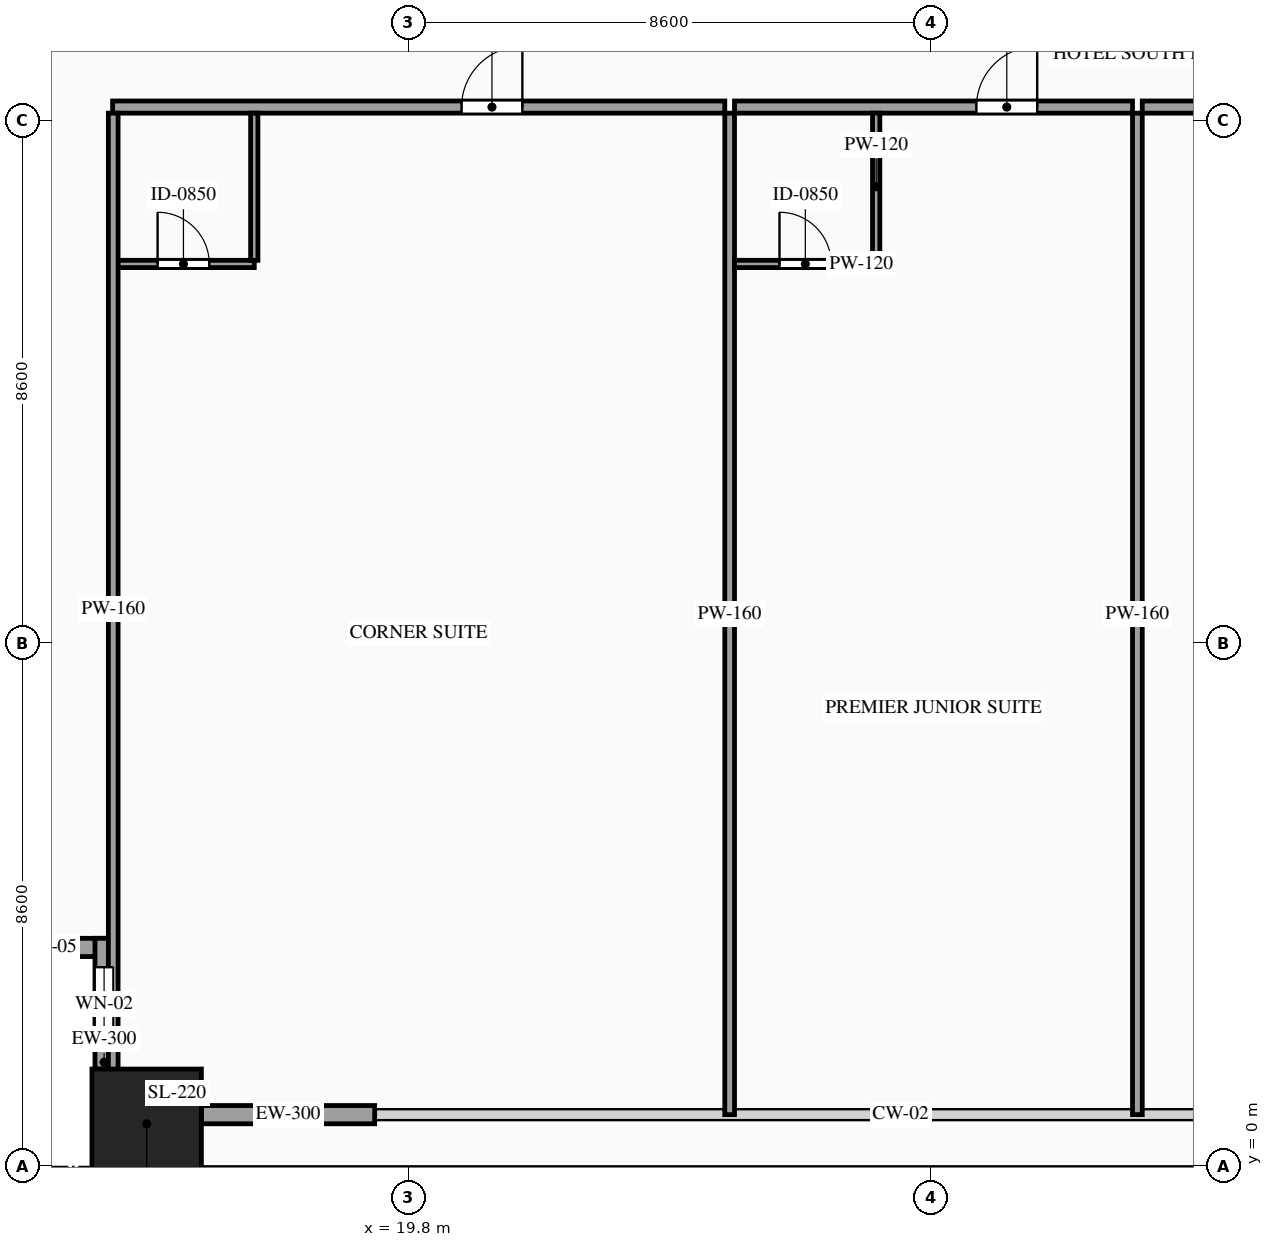
"""IFC4 building model, lengths in metres.
Left out: names, types, materials, properties, quantities, classifications, styles, units other than length and angle.
Written with IfcOpenShell. Run it as: python <this file> out.ifc"""

import sys

from ifc_helpers import new_model, si_unit, direction, frame, frame_2d, origin, origin_2d, place, context, subcontext, project, spatial, rectangle, hollow_rectangle, extrude, source, transform, mapped, element, fill, save


model = new_model("IFC4")
c1 = context("Model", 3, precision=1e-05, world=origin(), true_north=direction((0.0, 1.0)))
c2 = subcontext(c1, "Body", "Model", "MODEL_VIEW")
j1 = project(units=[si_unit("LENGTHUNIT", "METRE"), si_unit("PLANEANGLEUNIT", "RADIAN")], contexts=[c1])
p1 = place(None, origin())
s1 = spatial("IfcSite", under=j1, at=p1, CompositionType="ELEMENT")
p2 = place(p1, origin())
s2 = spatial("IfcBuilding", under=s1, at=p2, CompositionType="ELEMENT")
p3 = place(p2, frame((0.0, 0.0, 46.0)))
s3 = spatial("IfcBuildingStorey", under=s2, at=p3, CompositionType="ELEMENT", Elevation=46.0)
m1 = source(origin(), c2, "Body", "SweptSolid", [
    extrude(hollow_rectangle(XDim=1.8, YDim=1.8, WallThickness=0.08, at=origin_2d()), origin(), (0.0, 0.0, 1.0), 3.6),
])
p4 = place(p3, frame((15.5, 0.7, 0.0), z_axis=(0.0, 0.0, 1.0), x_axis=(1.0, 0.0, 0.0)))
e1 = element("IfcColumn", 1, at=p4, inside=s3, PredefinedType="COLUMN", context=c2, shape_type="MappedRepresentation", body=[
    mapped(m1, transform((0.0, 0.0, 0.0), scale=1.0)),
])
p5 = place(p3, frame((12.8, 3.6, 0.0), z_axis=(0.0, 0.0, 1.0), x_axis=(1.0, 0.0, 0.0)))
e2 = element("IfcWall", 2, at=p5, inside=s3, PredefinedType="SOLIDWALL", context=c2, shape_type="SweptSolid", body=[
    extrude(rectangle(XDim=2.15, YDim=0.3, at=frame_2d((1.075, 0.0))), origin(), (0.0, 0.0, 1.0), 3.38),
])
p6 = place(p5, frame((0.625, 0.0, 0.85)))
e3 = element("IfcOpeningElement", 3, at=p6, cuts=e2, PredefinedType="OPENING", context=c2, shape_type="SweptSolid", body=[
    extrude(rectangle(XDim=0.9, YDim=1.5, at=frame_2d((0.45, 0.75))), frame((0.0, 0.165, 0.0), z_axis=(0.0, -1.0, 0.0), x_axis=(1.0, 0.0, 0.0)), (0.0, 0.0, 1.0), 0.33),
])
p7 = place(p3, frame((14.8, 3.75, 0.0), z_axis=(0.0, 0.0, 1.0), x_axis=(0.0, -1.0, 0.0)))
e4 = element("IfcWall", 4, at=p7, inside=s3, PredefinedType="SOLIDWALL", context=c2, shape_type="SweptSolid", body=[
    extrude(rectangle(XDim=2.15, YDim=0.3, at=frame_2d((1.075, 0.0))), origin(), (0.0, 0.0, 1.0), 3.38),
])
p8 = place(p7, frame((0.475, 0.0, 0.85)))
e5 = element("IfcOpeningElement", 5, at=p8, cuts=e4, PredefinedType="OPENING", context=c2, shape_type="SweptSolid", body=[
    extrude(rectangle(XDim=1.2, YDim=2.1, at=frame_2d((0.6, 1.05))), frame((0.0, 0.165, 0.0), z_axis=(0.0, -1.0, 0.0), x_axis=(1.0, 0.0, 0.0)), (0.0, 0.0, 1.0), 0.33),
])
m2 = source(origin(), c2, "Body", "SweptSolid", [
    extrude(rectangle(XDim=2.85, YDim=0.3, at=frame_2d((1.425, 0.0))), origin(), (0.0, 0.0, 1.0), 2.775),
])
p9 = place(p3, frame((16.4, 0.85, 0.0), z_axis=(0.0, 0.0, 1.0), x_axis=(1.0, 0.0, 0.0)))
e6 = element("IfcWall", 6, at=p9, inside=s3, PredefinedType="SOLIDWALL", context=c2, shape_type="MappedRepresentation", body=[
    mapped(m2, transform((0.0, 0.0, 0.0), scale=1.0)),
])
p10 = place(p3, frame((14.94, 17.42, 0.0), z_axis=(0.0, 0.0, 1.0), x_axis=(1.0, 0.0, 0.0)))
e7 = element("IfcWall", 7, at=p10, inside=s3, PredefinedType="PARTITIONING", context=c2, shape_type="SweptSolid", body=[
    extrude(rectangle(XDim=10.068, YDim=0.2, at=frame_2d((5.034, 0.0))), origin(), (0.0, 0.0, 1.0), 3.38),
])
p11 = place(p10, frame((5.739, 0.0, 0.0)))
e8 = element("IfcOpeningElement", 8, at=p11, cuts=e7, PredefinedType="OPENING", context=c2, shape_type="SweptSolid", body=[
    extrude(rectangle(XDim=1.0, YDim=2.2, at=frame_2d((0.5, 1.1))), frame((0.0, 0.115, 0.0), z_axis=(0.0, -1.0, 0.0), x_axis=(1.0, 0.0, 0.0)), (0.0, 0.0, 1.0), 0.23),
])
m3 = source(origin(), c2, "Body", "SweptSolid", [
    extrude(rectangle(XDim=16.47, YDim=0.16, at=frame_2d((8.235, 0.0))), origin(), (0.0, 0.0, 1.0), 3.38),
])
p12 = place(p3, frame((25.088, 0.85, 0.0), z_axis=(0.0, 0.0, 1.0), x_axis=(0.0, 1.0, 0.0)))
e9 = element("IfcWall", 9, at=p12, inside=s3, PredefinedType="PARTITIONING", context=c2, shape_type="MappedRepresentation", body=[
    mapped(m3, transform((0.0, 0.0, 0.0), scale=1.0)),
])
p13 = place(p3, frame((14.94, 14.84, 0.0), z_axis=(0.0, 0.0, 1.0), x_axis=(1.0, 0.0, 0.0)))
e10 = element("IfcWall", 10, at=p13, inside=s3, PredefinedType="PARTITIONING", context=c2, shape_type="SweptSolid", body=[
    extrude(rectangle(XDim=2.33, YDim=0.12, at=frame_2d((1.165, 0.0))), origin(), (0.0, 0.0, 1.0), 3.38),
])
p14 = place(p13, frame((0.74, 0.0, 0.0)))
e11 = element("IfcOpeningElement", 11, at=p14, cuts=e10, PredefinedType="OPENING", context=c2, shape_type="SweptSolid", body=[
    extrude(rectangle(XDim=0.85, YDim=2.1, at=frame_2d((0.425, 1.05))), frame((0.0, 0.075, 0.0), z_axis=(0.0, -1.0, 0.0), x_axis=(1.0, 0.0, 0.0)), (0.0, 0.0, 1.0), 0.15),
])
m4 = source(origin(), c2, "Body", "SweptSolid", [
    extrude(rectangle(XDim=2.42, YDim=0.12, at=frame_2d((1.21, 0.0))), origin(), (0.0, 0.0, 1.0), 3.38),
])
p15 = place(p3, frame((17.27, 14.9, 0.0), z_axis=(0.0, 0.0, 1.0), x_axis=(0.0, 1.0, 0.0)))
e12 = element("IfcWall", 12, at=p15, inside=s3, PredefinedType="PARTITIONING", context=c2, shape_type="MappedRepresentation", body=[
    mapped(m4, transform((0.0, 0.0, 0.0), scale=1.0)),
])
p16 = place(p3, frame((25.168, 17.42, 0.0), z_axis=(0.0, 0.0, 1.0), x_axis=(1.0, 0.0, 0.0)))
e13 = element("IfcWall", 13, at=p16, inside=s3, PredefinedType="PARTITIONING", context=c2, shape_type="SweptSolid", body=[
    extrude(rectangle(XDim=6.546, YDim=0.2, at=frame_2d((3.273, 0.0))), origin(), (0.0, 0.0, 1.0), 3.38),
])
p17 = place(p16, frame((3.978, 0.0, 0.0)))
e14 = element("IfcOpeningElement", 14, at=p17, cuts=e13, PredefinedType="OPENING", context=c2, shape_type="SweptSolid", body=[
    extrude(rectangle(XDim=1.0, YDim=2.2, at=frame_2d((0.5, 1.1))), frame((0.0, 0.115, 0.0), z_axis=(0.0, -1.0, 0.0), x_axis=(1.0, 0.0, 0.0)), (0.0, 0.0, 1.0), 0.23),
])
p18 = place(p3, frame((31.794, 0.85, 0.0), z_axis=(0.0, 0.0, 1.0), x_axis=(0.0, 1.0, 0.0)))
e15 = element("IfcWall", 15, at=p18, inside=s3, PredefinedType="PARTITIONING", context=c2, shape_type="MappedRepresentation", body=[
    mapped(m3, transform((0.0, 0.0, 0.0), scale=1.0)),
])
p19 = place(p3, frame((25.168, 14.84, 0.0), z_axis=(0.0, 0.0, 1.0), x_axis=(1.0, 0.0, 0.0)))
e16 = element("IfcWall", 16, at=p19, inside=s3, PredefinedType="PARTITIONING", context=c2, shape_type="SweptSolid", body=[
    extrude(rectangle(XDim=2.33, YDim=0.12, at=frame_2d((1.165, 0.0))), origin(), (0.0, 0.0, 1.0), 3.38),
])
p20 = place(p19, frame((0.74, 0.0, 0.0)))
e17 = element("IfcOpeningElement", 17, at=p20, cuts=e16, PredefinedType="OPENING", context=c2, shape_type="SweptSolid", body=[
    extrude(rectangle(XDim=0.85, YDim=2.1, at=frame_2d((0.425, 1.05))), frame((0.0, 0.075, 0.0), z_axis=(0.0, -1.0, 0.0), x_axis=(1.0, 0.0, 0.0)), (0.0, 0.0, 1.0), 0.15),
])
p21 = place(p3, frame((27.498, 14.9, 0.0), z_axis=(0.0, 0.0, 1.0), x_axis=(0.0, 1.0, 0.0)))
e18 = element("IfcWall", 18, at=p21, inside=s3, PredefinedType="PARTITIONING", context=c2, shape_type="MappedRepresentation", body=[
    mapped(m4, transform((0.0, 0.0, 0.0), scale=1.0)),
])
p22 = place(p3, frame((31.874, 17.42, 0.0), z_axis=(0.0, 0.0, 1.0), x_axis=(1.0, 0.0, 0.0)))
e19 = element("IfcWall", 19, at=p22, inside=s3, PredefinedType="PARTITIONING", context=c2, shape_type="SweptSolid", body=[
    extrude(rectangle(XDim=10.782, YDim=0.2, at=frame_2d((5.391, 0.0))), origin(), (0.0, 0.0, 1.0), 3.38),
])
p23 = place(p22, frame((4.891, 0.0, 0.0)))
e20 = element("IfcOpeningElement", 20, at=p23, cuts=e19, PredefinedType="OPENING", context=c2, shape_type="SweptSolid", body=[
    extrude(rectangle(XDim=1.0, YDim=2.2, at=frame_2d((0.5, 1.1))), frame((0.0, 0.115, 0.0), z_axis=(0.0, -1.0, 0.0), x_axis=(1.0, 0.0, 0.0)), (0.0, 0.0, 1.0), 0.23),
])
m5 = source(origin(), c2, "Body", "SweptSolid", [
    extrude(rectangle(XDim=16.32, YDim=0.16, at=frame_2d((8.16, 0.0))), origin(), (0.0, 0.0, 1.0), 3.38),
])
p24 = place(p3, frame((14.95, 1.0, 0.0), z_axis=(0.0, 0.0, 1.0), x_axis=(0.0, 1.0, 0.0)))
e21 = element("IfcWall", 21, at=p24, inside=s3, PredefinedType="PARTITIONING", context=c2, shape_type="MappedRepresentation", body=[
    mapped(m5, transform((0.0, 0.0, 0.0), scale=1.0)),
])
m6 = source(origin(), c2, "Body", "SweptSolid", [
    extrude(rectangle(XDim=0.9, YDim=1.5, at=frame_2d((0.45, 0.75))), frame((0.0, 0.03, 0.0), z_axis=(0.0, -1.0, 0.0), x_axis=(1.0, 0.0, 0.0)), (0.0, 0.0, 1.0), 0.06),
])
p25 = place(p6, origin())
e22 = element("IfcWindow", 22, at=p25, inside=s3, PartitioningType="SINGLE_PANEL", PredefinedType="WINDOW", context=c2, shape_type="MappedRepresentation", body=[
    mapped(m6, transform((0.0, 0.0, 0.0), scale=1.0)),
])
fill(e3, e22)
m7 = source(origin(), c2, "Body", "SweptSolid", [
    extrude(rectangle(XDim=1.2, YDim=2.1, at=frame_2d((0.6, 1.05))), frame((0.0, 0.03, 0.0), z_axis=(0.0, -1.0, 0.0), x_axis=(1.0, 0.0, 0.0)), (0.0, 0.0, 1.0), 0.06),
])
p26 = place(p8, origin())
e23 = element("IfcWindow", 23, at=p26, inside=s3, PartitioningType="SINGLE_PANEL", PredefinedType="WINDOW", context=c2, shape_type="MappedRepresentation", body=[
    mapped(m7, transform((0.0, 0.0, 0.0), scale=1.0)),
])
fill(e5, e23)
m8 = source(origin(), c2, "Body", "SweptSolid", [
    extrude(rectangle(XDim=1.0, YDim=2.2, at=frame_2d((0.5, 1.1))), frame((0.0, 0.025, 0.0), z_axis=(0.0, -1.0, 0.0), x_axis=(1.0, 0.0, 0.0)), (0.0, 0.0, 1.0), 0.05),
])
p27 = place(p11, origin())
e24 = element("IfcDoor", 24, at=p27, inside=s3, OperationType="SINGLE_SWING_RIGHT", PredefinedType="DOOR", context=c2, shape_type="MappedRepresentation", body=[
    mapped(m8, transform((0.0, 0.0, 0.0), scale=1.0)),
])
fill(e8, e24)
m9 = source(origin(), c2, "Body", "SweptSolid", [
    extrude(rectangle(XDim=0.85, YDim=2.1, at=frame_2d((0.425, 1.05))), frame((0.0, 0.025, 0.0), z_axis=(0.0, -1.0, 0.0), x_axis=(1.0, 0.0, 0.0)), (0.0, 0.0, 1.0), 0.05),
])
p28 = place(p14, origin())
e25 = element("IfcDoor", 25, at=p28, inside=s3, OperationType="SINGLE_SWING_LEFT", PredefinedType="DOOR", context=c2, shape_type="MappedRepresentation", body=[
    mapped(m9, transform((0.0, 0.0, 0.0), scale=1.0)),
])
fill(e11, e25)
p29 = place(p17, origin())
e26 = element("IfcDoor", 26, at=p29, inside=s3, OperationType="SINGLE_SWING_RIGHT", PredefinedType="DOOR", context=c2, shape_type="MappedRepresentation", body=[
    mapped(m8, transform((0.0, 0.0, 0.0), scale=1.0)),
])
fill(e14, e26)
p30 = place(p20, origin())
e27 = element("IfcDoor", 27, at=p30, inside=s3, OperationType="SINGLE_SWING_LEFT", PredefinedType="DOOR", context=c2, shape_type="MappedRepresentation", body=[
    mapped(m9, transform((0.0, 0.0, 0.0), scale=1.0)),
])
fill(e17, e27)
save(model, sys.argv[1])
